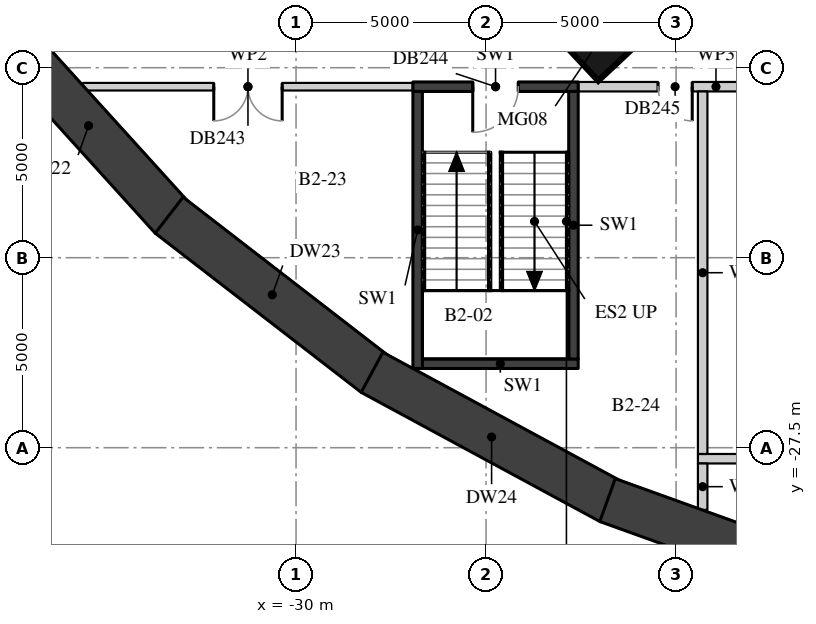
"""IFC4 building model, lengths in metres.
Left out: names, types, materials, properties, quantities, classifications, styles, units other than length and angle.
Written with IfcOpenShell. Run it as: python <this file> out.ifc"""

import sys

from ifc_helpers import new_model, si_unit, direction, frame, frame_2d, origin, origin_2d, place, context, subcontext, project, spatial, rectangle, extrude, element, fill, save


model = new_model("IFC4")
c1 = context("Model", 3, precision=1e-05, world=origin(), true_north=direction((0.0, 1.0)))
c2 = subcontext(c1, "Body", "Model", "MODEL_VIEW")
j1 = project(units=[si_unit("LENGTHUNIT", "METRE"), si_unit("PLANEANGLEUNIT", "RADIAN")], contexts=[c1])
p1 = place(None, origin())
s1 = spatial("IfcSite", under=j1, at=p1, CompositionType="ELEMENT")
p2 = place(p1, origin())
s2 = spatial("IfcBuilding", under=s1, at=p2, CompositionType="ELEMENT")
p3 = place(p2, frame((0.0, 0.0, -10.4)))
s3 = spatial("IfcBuildingStorey", under=s2, at=p3, CompositionType="ELEMENT", Elevation=-10.4)
p4 = place(p3, frame((-37.657, -16.601, 0.0), z_axis=(0.0, 0.0, 1.0), x_axis=(0.671487423502, -0.741015951299, 0.0)))
e1 = element("IfcWall", 1, at=p4, inside=s3, PredefinedType="USERDEFINED", context=c2, shape_type="SweptSolid", body=[
    extrude(rectangle(XDim=6.545, YDim=1.2, at=frame_2d((3.272, 0.0))), origin(), (0.0, 0.0, 1.0), 5.2),
])
p5 = place(p3, frame((-33.339, -21.38, 0.0), z_axis=(0.0, 0.0, 1.0), x_axis=(0.791286567459, -0.611445474396, 0.0)))
e2 = element("IfcWall", 2, at=p5, inside=s3, PredefinedType="USERDEFINED", context=c2, shape_type="SweptSolid", body=[
    extrude(rectangle(XDim=6.857, YDim=1.2, at=frame_2d((3.428, 0.0))), origin(), (0.0, 0.0, 1.0), 5.2),
])
p6 = place(p3, frame((-28.0, -25.516, 0.0), z_axis=(0.0, 0.0, 1.0), x_axis=(0.879519330959, -0.475863159394, 0.0)))
e3 = element("IfcWall", 3, at=p6, inside=s3, PredefinedType="USERDEFINED", context=c2, shape_type="SweptSolid", body=[
    extrude(rectangle(XDim=7.155, YDim=1.2, at=frame_2d((3.577, 0.0))), origin(), (0.0, 0.0, 1.0), 5.2),
])
p7 = place(p3, frame((-21.803, -28.878, 0.0), z_axis=(0.0, 0.0, 1.0), x_axis=(0.940789454531, -0.338991448628, 0.0)))
e4 = element("IfcWall", 4, at=p7, inside=s3, PredefinedType="USERDEFINED", context=c2, shape_type="SweptSolid", body=[
    extrude(rectangle(XDim=7.406, YDim=1.2, at=frame_2d((3.703, 0.0))), origin(), (0.0, 0.0, 1.0), 5.2),
])
p8 = place(p3, frame((-21.641, -16.23, 0.0), z_axis=(0.0, 0.0, 1.0), x_axis=(-0.730113022917, -0.683326403535, 0.0)))
e5 = element("IfcColumn", 5, at=p8, inside=s3, PredefinedType="COLUMN", context=c2, shape_type="SweptSolid", body=[
    extrude(rectangle(XDim=2.8, YDim=1.8, at=origin_2d()), origin(), (0.0, 0.0, 1.0), 5.2),
])
p9 = place(p3, frame((-19.425, -27.79, 0.0), z_axis=(0.0, 0.0, 1.0), x_axis=(1.0, 0.0, 0.0)))
e6 = element("IfcWall", 6, at=p9, inside=s3, PredefinedType="PARTITIONING", context=c2, shape_type="SweptSolid", body=[
    extrude(rectangle(XDim=4.35, YDim=0.25, at=frame_2d((2.175, 0.0))), origin(), (0.0, 0.0, 1.0), 4.75),
])
p10 = place(p3, frame((-26.675, -25.29, 0.0), z_axis=(0.0, 0.0, 1.0), x_axis=(1.0, 0.0, 0.0)))
e7 = element("IfcWall", 7, at=p10, inside=s3, PredefinedType="SOLIDWALL", context=c2, shape_type="SweptSolid", body=[
    extrude(rectangle(XDim=4.1, YDim=0.25, at=frame_2d((2.05, 0.0))), origin(), (0.0, 0.0, 1.0), 4.75),
])
p11 = place(p3, frame((-35.605, -18.0, 0.0), z_axis=(0.0, 0.0, 1.0), x_axis=(1.0, 0.0, 0.0)))
e8 = element("IfcWall", 8, at=p11, inside=s3, PredefinedType="PARTITIONING", context=c2, shape_type="SweptSolid", body=[
    extrude(rectangle(XDim=8.68, YDim=0.2, at=frame_2d((4.34, 0.0))), origin(), (0.0, 0.0, 1.0), 4.75),
])
p12 = place(p11, frame((3.44, 0.0, 0.0)))
e9 = element("IfcOpeningElement", 9, at=p12, cuts=e8, PredefinedType="OPENING", context=c2, shape_type="SweptSolid", body=[
    extrude(rectangle(XDim=1.8, YDim=2.1, at=frame_2d((0.9, 1.05))), frame((0.0, 0.11, 0.0), z_axis=(0.0, -1.0, 0.0), x_axis=(1.0, 0.0, 0.0)), (0.0, 0.0, 1.0), 0.22),
])
p13 = place(p3, frame((-26.925, -18.0, 0.0), z_axis=(0.0, 0.0, 1.0), x_axis=(1.0, 0.0, 0.0)))
e10 = element("IfcWall", 10, at=p13, inside=s3, PredefinedType="SOLIDWALL", context=c2, shape_type="SweptSolid", body=[
    extrude(rectangle(XDim=4.35, YDim=0.25, at=frame_2d((2.175, 0.0))), origin(), (0.0, 0.0, 1.0), 4.75),
])
p14 = place(p13, frame((1.575, 0.0, 0.0)))
e11 = element("IfcOpeningElement", 11, at=p14, cuts=e10, PredefinedType="OPENING", context=c2, shape_type="SweptSolid", body=[
    extrude(rectangle(XDim=1.2, YDim=2.1, at=frame_2d((0.6, 1.05))), frame((0.0, 0.135, 0.0), z_axis=(0.0, -1.0, 0.0), x_axis=(1.0, 0.0, 0.0)), (0.0, 0.0, 1.0), 0.27),
])
p15 = place(p3, frame((-22.575, -18.0, 0.0), z_axis=(0.0, 0.0, 1.0), x_axis=(1.0, 0.0, 0.0)))
e12 = element("IfcWall", 12, at=p15, inside=s3, PredefinedType="PARTITIONING", context=c2, shape_type="SweptSolid", body=[
    extrude(rectangle(XDim=7.25, YDim=0.25, at=frame_2d((3.625, 0.0))), origin(), (0.0, 0.0, 1.0), 4.75),
])
p16 = place(p15, frame((2.1, 0.0, 0.0)))
e13 = element("IfcOpeningElement", 13, at=p16, cuts=e12, PredefinedType="OPENING", context=c2, shape_type="SweptSolid", body=[
    extrude(rectangle(XDim=0.9, YDim=2.1, at=frame_2d((0.45, 1.05))), frame((0.0, 0.135, 0.0), z_axis=(0.0, -1.0, 0.0), x_axis=(1.0, 0.0, 0.0)), (0.0, 0.0, 1.0), 0.27),
])
p17 = place(p15, frame((4.7, 0.0, 0.0)))
e14 = element("IfcOpeningElement", 14, at=p17, cuts=e12, PredefinedType="OPENING", context=c2, shape_type="SweptSolid", body=[
    extrude(rectangle(XDim=1.0, YDim=2.1, at=frame_2d((0.5, 1.05))), frame((0.0, 0.135, 0.0), z_axis=(0.0, -1.0, 0.0), x_axis=(1.0, 0.0, 0.0)), (0.0, 0.0, 1.0), 0.27),
])
p18 = place(p3, frame((-26.8, -25.415, 0.0), z_axis=(0.0, 0.0, 1.0), x_axis=(0.0, 1.0, 0.0)))
e15 = element("IfcWall", 15, at=p18, inside=s3, PredefinedType="SOLIDWALL", context=c2, shape_type="SweptSolid", body=[
    extrude(rectangle(XDim=7.29, YDim=0.25, at=frame_2d((3.645, 0.0))), origin(), (0.0, 0.0, 1.0), 4.75),
])
p19 = place(p3, frame((-22.7, -25.165, 0.0), z_axis=(0.0, 0.0, 1.0), x_axis=(0.0, 1.0, 0.0)))
e16 = element("IfcWall", 16, at=p19, inside=s3, PredefinedType="SOLIDWALL", context=c2, shape_type="SweptSolid", body=[
    extrude(rectangle(XDim=7.04, YDim=0.25, at=frame_2d((3.52, 0.0))), origin(), (0.0, 0.0, 1.0), 4.75),
])
p20 = place(p3, frame((-19.3, -29.136, 0.0), z_axis=(0.0, 0.0, 1.0), x_axis=(0.0, 1.0, 0.0)))
e17 = element("IfcWall", 17, at=p20, inside=s3, PredefinedType="PARTITIONING", context=c2, shape_type="SweptSolid", body=[
    extrude(rectangle(XDim=1.221, YDim=0.25, at=frame_2d((0.611, 0.0))), origin(), (0.0, 0.0, 1.0), 4.75),
])
p21 = place(p3, frame((-19.3, -27.665, 0.0), z_axis=(0.0, 0.0, 1.0), x_axis=(0.0, 1.0, 0.0)))
e18 = element("IfcWall", 18, at=p21, inside=s3, PredefinedType="PARTITIONING", context=c2, shape_type="SweptSolid", body=[
    extrude(rectangle(XDim=9.54, YDim=0.25, at=frame_2d((4.77, 0.0))), origin(), (0.0, 0.0, 1.0), 4.75),
])
p22 = place(p14, origin())
e19 = element("IfcDoor", 19, at=p22, inside=s3, OperationType="SINGLE_SWING_RIGHT", PredefinedType="DOOR", context=c2, shape_type="SweptSolid", body=[
    extrude(rectangle(XDim=1.2, YDim=2.1, at=frame_2d((0.6, 1.05))), frame((0.0, 0.025, 0.0), z_axis=(0.0, -1.0, 0.0), x_axis=(1.0, 0.0, 0.0)), (0.0, 0.0, 1.0), 0.05),
])
fill(e11, e19)
p23 = place(p12, origin())
e20 = element("IfcDoor", 20, at=p23, inside=s3, OperationType="DOUBLE_DOOR_SINGLE_SWING", PredefinedType="DOOR", context=c2, shape_type="SweptSolid", body=[
    extrude(rectangle(XDim=1.8, YDim=2.1, at=frame_2d((0.9, 1.05))), frame((0.0, 0.025, 0.0), z_axis=(0.0, -1.0, 0.0), x_axis=(1.0, 0.0, 0.0)), (0.0, 0.0, 1.0), 0.05),
])
fill(e9, e20)
p24 = place(p16, origin())
e21 = element("IfcDoor", 21, at=p24, inside=s3, OperationType="SINGLE_SWING_LEFT", PredefinedType="DOOR", context=c2, shape_type="SweptSolid", body=[
    extrude(rectangle(XDim=0.9, YDim=2.1, at=frame_2d((0.45, 1.05))), frame((0.0, 0.025, 0.0), z_axis=(0.0, -1.0, 0.0), x_axis=(1.0, 0.0, 0.0)), (0.0, 0.0, 1.0), 0.05),
])
fill(e13, e21)
save(model, sys.argv[1])
